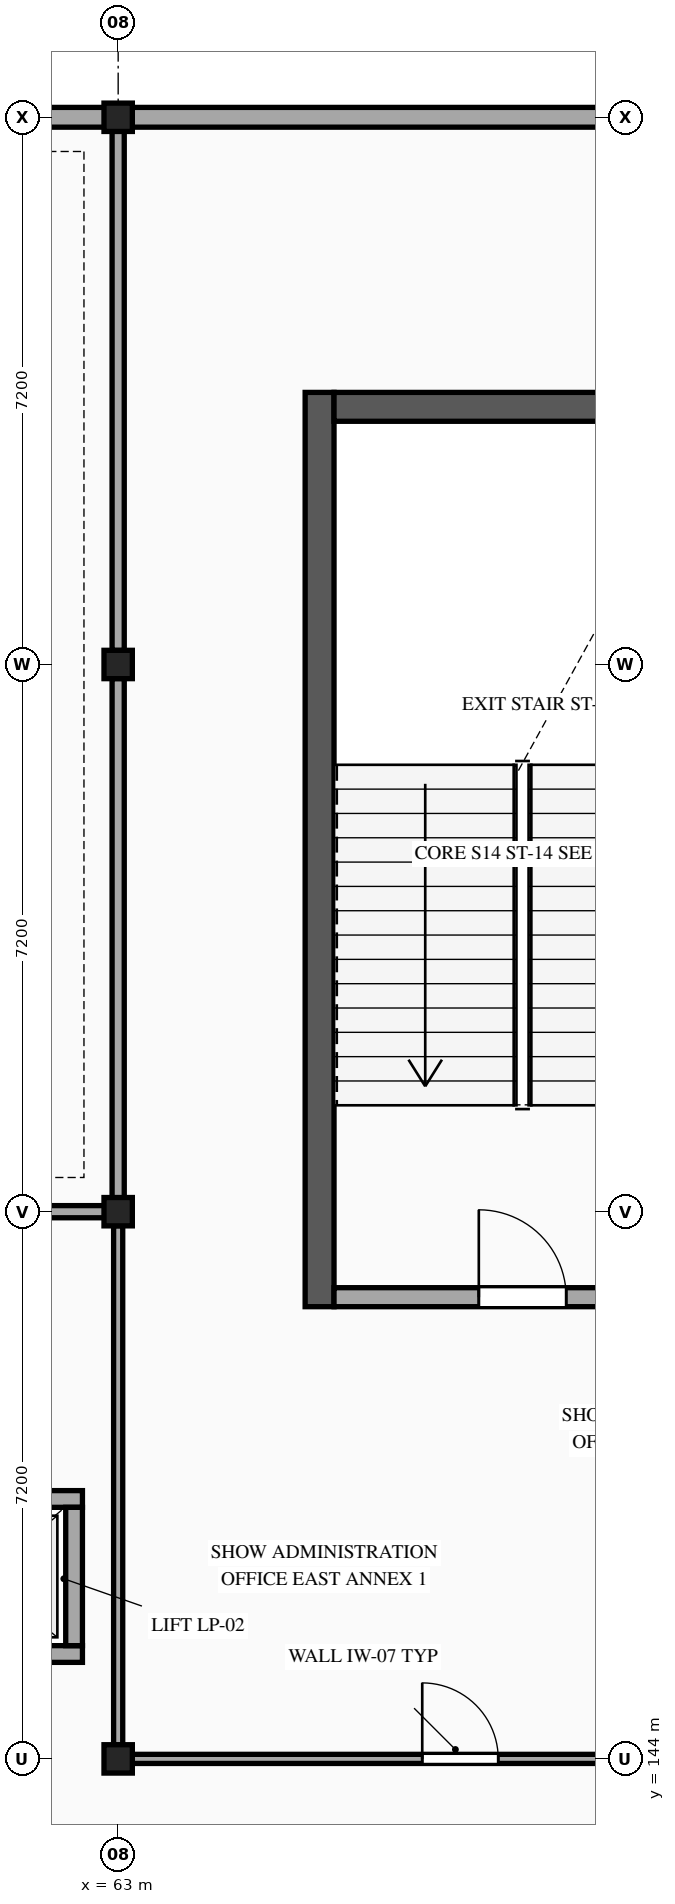
"""IFC4 building model, lengths in metres.
Left out: names, types, materials, properties, quantities, classifications, styles, units other than length and angle.
Written with IfcOpenShell. Run it as: python <this file> out.ifc"""

import sys

from ifc_helpers import new_model, si_unit, direction, frame, frame_2d, origin, origin_2d, place, context, subcontext, project, spatial, rectangle, i_section, extrude, element, fill, save


model = new_model("IFC4")
c1 = context("Model", 3, precision=1e-05, world=origin(), true_north=direction((0.0, 1.0)))
c2 = subcontext(c1, "Body", "Model", "MODEL_VIEW")
j1 = project(units=[si_unit("LENGTHUNIT", "METRE"), si_unit("PLANEANGLEUNIT", "RADIAN")], contexts=[c1])
p1 = place(None, origin())
s1 = spatial("IfcSite", under=j1, at=p1, CompositionType="ELEMENT")
p2 = place(p1, origin())
s2 = spatial("IfcBuilding", under=s1, at=p2, CompositionType="ELEMENT")
p3 = place(p2, frame((0.0, 0.0, 19.8)))
s3 = spatial("IfcBuildingStorey", under=s2, at=p3, CompositionType="ELEMENT", Elevation=19.8)
for number, where, z_axis, x_axis in (
    (1, (63.0, 144.0, 0.0), (0.0, 0.0, 1.0), (1.0, 0.0, 0.0)),
    (2, (63.0, 151.2, 0.0), (0.0, 0.0, 1.0), (1.0, 0.0, 0.0)),
    (3, (63.0, 158.4, 0.0), (0.0, 0.0, 1.0), (1.0, 0.0, 0.0)),
    (4, (63.0, 165.6, 0.0), (0.0, 0.0, 1.0), (1.0, 0.0, 0.0)),
):
    element("IfcColumn", number, at=place(p3, frame(where, z_axis=z_axis, x_axis=x_axis)), inside=s3, PredefinedType="COLUMN", context=c2, shape_type="SweptSolid", body=[
        extrude(i_section(OverallWidth=0.373, OverallDepth=0.373, WebThickness=0.016, FlangeThickness=0.026, at=origin_2d()), origin(), (0.0, 0.0, 1.0), 4.5),
    ])
p4 = place(p3, frame((65.65, 149.95, 0.0), z_axis=(0.0, 0.0, 1.0), x_axis=(0.0, 1.0, 0.0)))
e5 = element("IfcWall", 5, at=p4, inside=s3, PredefinedType="SHEAR", context=c2, shape_type="SweptSolid", body=[
    extrude(rectangle(XDim=12.03, YDim=0.38, at=frame_2d((6.015, 0.0))), origin(), (0.0, 0.0, 1.0), 4.26),
])
p5 = place(p3, frame((65.84, 161.79, 0.0), z_axis=(0.0, 0.0, 1.0), x_axis=(1.0, 0.0, 0.0)))
e6 = element("IfcWall", 6, at=p5, inside=s3, PredefinedType="SHEAR", context=c2, shape_type="SweptSolid", body=[
    extrude(rectangle(XDim=4.96, YDim=0.38, at=frame_2d((2.48, 0.0))), origin(), (0.0, 0.0, 1.0), 4.26),
])
p6 = place(p3, frame((54.006, 165.6, 0.0), z_axis=(0.0, 0.0, 1.0), x_axis=(1.0, 0.0, 0.0)))
e7 = element("IfcWall", 7, at=p6, inside=s3, PredefinedType="STANDARD", context=c2, shape_type="SweptSolid", body=[
    extrude(rectangle(XDim=8.988, YDim=0.26, at=frame_2d((4.494, 0.0))), origin(), (0.0, 0.0, 1.0), 3.648),
])
p7 = place(p3, frame((63.006, 165.6, 0.0), z_axis=(0.0, 0.0, 1.0), x_axis=(1.0, 0.0, 0.0)))
e8 = element("IfcWall", 8, at=p7, inside=s3, PredefinedType="STANDARD", context=c2, shape_type="SweptSolid", body=[
    extrude(rectangle(XDim=8.989, YDim=0.26, at=frame_2d((4.495, 0.0))), origin(), (0.0, 0.0, 1.0), 3.648),
])
p8 = place(p3, frame((59.87, 145.38, 0.0), z_axis=(0.0, 0.0, 1.0), x_axis=(1.0, 0.0, 0.0)))
e9 = element("IfcWall", 9, at=p8, inside=s3, PredefinedType="STANDARD", context=c2, shape_type="SweptSolid", body=[
    extrude(rectangle(XDim=2.66, YDim=0.22, at=frame_2d((1.33, 0.0))), origin(), (0.0, 0.0, 1.0), 4.25),
])
p9 = place(p8, frame((0.73, 0.0, 0.0)))
e10 = element("IfcOpeningElement", 10, at=p9, cuts=e9, PredefinedType="OPENING", context=c2, shape_type="SweptSolid", body=[
    extrude(rectangle(XDim=1.2, YDim=2.2, at=frame_2d((0.6, 1.1))), frame((0.0, 0.12, 0.0), z_axis=(0.0, -1.0, 0.0), x_axis=(1.0, 0.0, 0.0)), (0.0, 0.0, 1.0), 0.24),
])
p10 = place(p3, frame((62.53, 147.42, 0.0), z_axis=(0.0, 0.0, 1.0), x_axis=(-1.0, 0.0, 0.0)))
e11 = element("IfcWall", 11, at=p10, inside=s3, PredefinedType="STANDARD", context=c2, shape_type="SweptSolid", body=[
    extrude(rectangle(XDim=2.66, YDim=0.22, at=frame_2d((1.33, 0.0))), origin(), (0.0, 0.0, 1.0), 4.25),
])
p11 = place(p3, frame((62.42, 145.49, 0.0), z_axis=(0.0, 0.0, 1.0), x_axis=(0.0, 1.0, 0.0)))
e12 = element("IfcWall", 12, at=p11, inside=s3, PredefinedType="STANDARD", context=c2, shape_type="SweptSolid", body=[
    extrude(rectangle(XDim=1.82, YDim=0.22, at=frame_2d((0.91, 0.0))), origin(), (0.0, 0.0, 1.0), 4.25),
])
p12 = place(p3, frame((65.84, 150.075, 0.0), z_axis=(0.0, 0.0, 1.0), x_axis=(1.0, 0.0, 0.0)))
e13 = element("IfcWall", 13, at=p12, inside=s3, PredefinedType="STANDARD", context=c2, shape_type="SweptSolid", body=[
    extrude(rectangle(XDim=4.96, YDim=0.25, at=frame_2d((2.48, 0.0))), origin(), (0.0, 0.0, 1.0), 4.25),
])
p13 = place(p12, frame((1.905, 0.0, 0.0)))
e14 = element("IfcOpeningElement", 14, at=p13, cuts=e13, PredefinedType="OPENING", context=c2, shape_type="SweptSolid", body=[
    extrude(rectangle(XDim=1.15, YDim=2.2, at=frame_2d((0.575, 1.1))), frame((0.0, 0.135, 0.0), z_axis=(0.0, -1.0, 0.0), x_axis=(1.0, 0.0, 0.0)), (0.0, 0.0, 1.0), 0.27),
])
p14 = place(p3, frame((63.006, 144.0, 0.0), z_axis=(0.0, 0.0, 1.0), x_axis=(1.0, 0.0, 0.0)))
e15 = element("IfcWall", 15, at=p14, inside=s3, PredefinedType="PARTITIONING", context=c2, shape_type="SweptSolid", body=[
    extrude(rectangle(XDim=8.989, YDim=0.12, at=frame_2d((4.495, 0.0))), origin(), (0.0, 0.0, 1.0), 3.648),
])
p15 = place(p14, frame((3.994, 0.0, 0.0)))
e16 = element("IfcOpeningElement", 16, at=p15, cuts=e15, PredefinedType="OPENING", context=c2, shape_type="SweptSolid", body=[
    extrude(rectangle(XDim=1.0, YDim=2.15, at=frame_2d((0.5, 1.075))), frame((0.0, 0.07, 0.0), z_axis=(0.0, -1.0, 0.0), x_axis=(1.0, 0.0, 0.0)), (0.0, 0.0, 1.0), 0.14),
])
p16 = place(p3, frame((54.006, 151.2, 0.0), z_axis=(0.0, 0.0, 1.0), x_axis=(1.0, 0.0, 0.0)))
e17 = element("IfcWall", 17, at=p16, inside=s3, PredefinedType="PARTITIONING", context=c2, shape_type="SweptSolid", body=[
    extrude(rectangle(XDim=8.988, YDim=0.16, at=frame_2d((4.494, 0.0))), origin(), (0.0, 0.0, 1.0), 3.648),
])
p17 = place(p16, frame((3.694, 0.0, 0.0)))
e18 = element("IfcOpeningElement", 18, at=p17, cuts=e17, PredefinedType="OPENING", context=c2, shape_type="SweptSolid", body=[
    extrude(rectangle(XDim=1.6, YDim=2.2, at=frame_2d((0.8, 1.1))), frame((0.0, 0.09, 0.0), z_axis=(0.0, -1.0, 0.0), x_axis=(1.0, 0.0, 0.0)), (0.0, 0.0, 1.0), 0.18),
])
p18 = place(p3, frame((63.0, 144.185, 0.0), z_axis=(0.0, 0.0, 1.0), x_axis=(0.0, 1.0, 0.0)))
e19 = element("IfcWall", 19, at=p18, inside=s3, PredefinedType="PARTITIONING", context=c2, shape_type="SweptSolid", body=[
    extrude(rectangle(XDim=6.831, YDim=0.12, at=frame_2d((3.416, 0.0))), origin(), (0.0, 0.0, 1.0), 3.648),
])
for number, where, z_axis, x_axis in (
    (20, (63.0, 151.385, 0.0), (0.0, 0.0, 1.0), (0.0, 1.0, 0.0)),
    (21, (63.0, 158.584, 0.0), (0.0, 0.0, 1.0), (0.0, 1.0, 0.0)),
):
    element("IfcWall", number, at=place(p3, frame(where, z_axis=z_axis, x_axis=x_axis)), inside=s3, PredefinedType="PARTITIONING", context=c2, shape_type="SweptSolid", body=[
        extrude(rectangle(XDim=6.831, YDim=0.16, at=frame_2d((3.416, 0.0))), origin(), (0.0, 0.0, 1.0), 3.648),
    ])
p19 = place(p13, origin())
e22 = element("IfcDoor", 22, at=p19, inside=s3, OperationType="SINGLE_SWING_LEFT", PredefinedType="DOOR", context=c2, shape_type="SweptSolid", body=[
    extrude(rectangle(XDim=1.15, YDim=2.2, at=frame_2d((0.575, 1.1))), frame((0.0, 0.025, 0.0), z_axis=(0.0, -1.0, 0.0), x_axis=(1.0, 0.0, 0.0)), (0.0, 0.0, 1.0), 0.05),
])
fill(e14, e22)
p20 = place(p15, origin())
e23 = element("IfcDoor", 23, at=p20, inside=s3, OperationType="SINGLE_SWING_LEFT", PredefinedType="DOOR", context=c2, shape_type="SweptSolid", body=[
    extrude(rectangle(XDim=1.0, YDim=2.15, at=frame_2d((0.5, 1.075))), frame((0.0, 0.025, 0.0), z_axis=(0.0, -1.0, 0.0), x_axis=(1.0, 0.0, 0.0)), (0.0, 0.0, 1.0), 0.05),
])
fill(e16, e23)
save(model, sys.argv[1])
